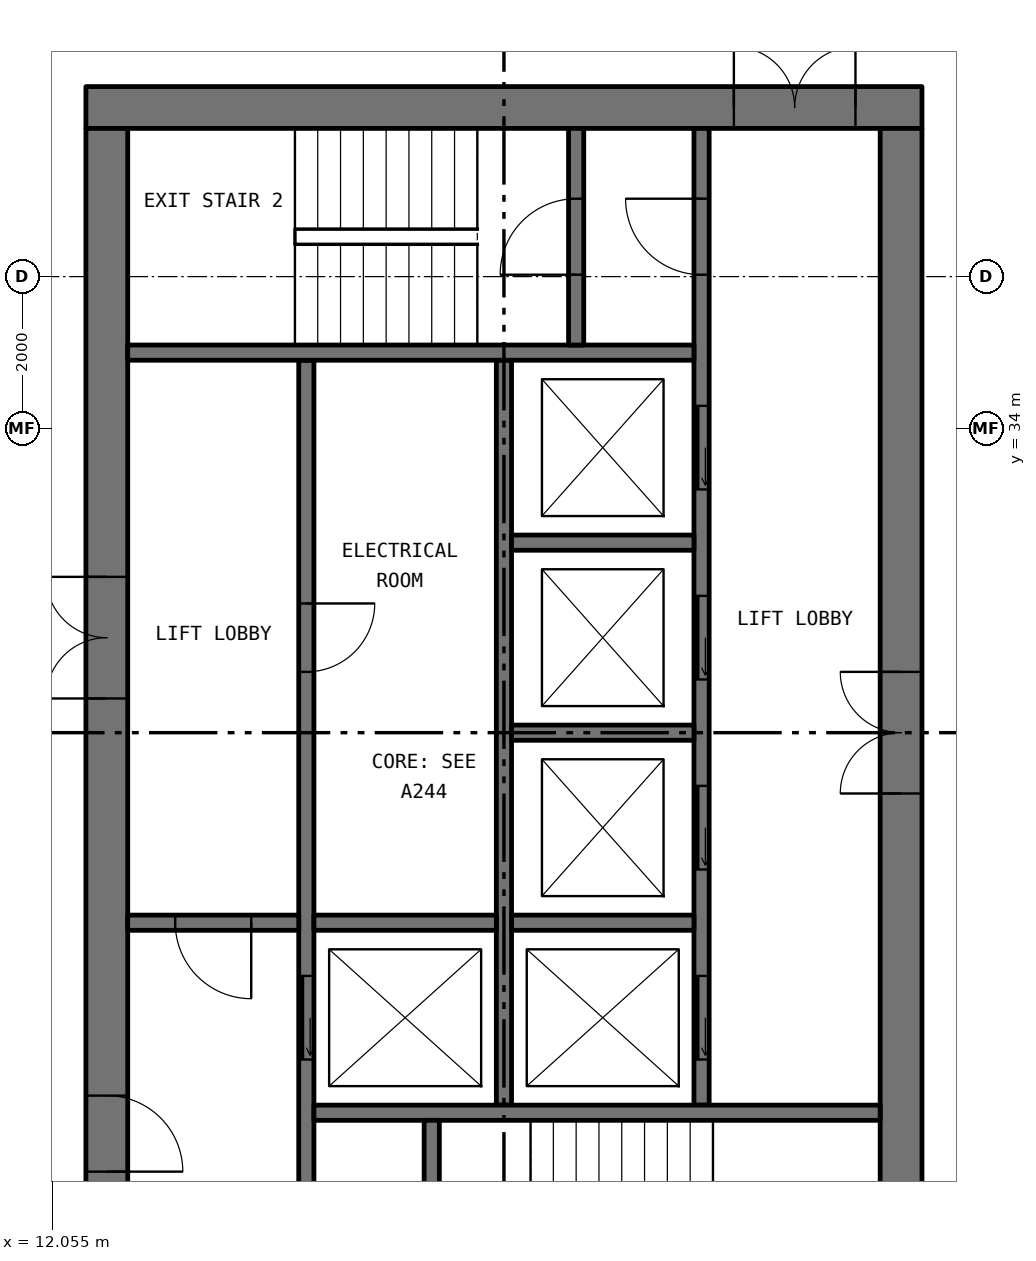
"""IFC4 building model, lengths in metres.
Left out: names, types, materials, properties, quantities, classifications, styles, units other than length and angle.
Written with IfcOpenShell. Run it as: python <this file> out.ifc"""

import sys

from ifc_helpers import new_model, si_unit, direction, frame, frame_2d, origin, place, context, subcontext, project, spatial, rectangle, extrude, element, fill, save


model = new_model("IFC4")
c1 = context("Model", 3, precision=1e-05, world=origin(), true_north=direction((0.0, 1.0)))
c2 = subcontext(c1, "Body", "Model", "MODEL_VIEW")
j1 = project(units=[si_unit("LENGTHUNIT", "METRE"), si_unit("PLANEANGLEUNIT", "RADIAN")], contexts=[c1])
p1 = place(None, origin())
s1 = spatial("IfcSite", under=j1, at=p1, CompositionType="ELEMENT")
p2 = place(p1, origin())
s2 = spatial("IfcBuilding", under=s1, at=p2, CompositionType="ELEMENT")
p3 = place(p2, frame((0.0, 0.0, 165.15)))
s3 = spatial("IfcBuildingStorey", under=s2, at=p3, CompositionType="ELEMENT", Elevation=165.15)
p4 = place(p3, frame((12.5, 38.225, 0.0), z_axis=(0.0, 0.0, 1.0), x_axis=(1.0, 0.0, 0.0)))
e1 = element("IfcWall", 1, at=p4, inside=s3, PredefinedType="SHEAR", context=c2, shape_type="SweptSolid", body=[
    extrude(rectangle(XDim=11.0, YDim=0.55, at=frame_2d((5.5, 0.0))), origin(), (0.0, 0.0, 1.0), 3.05),
])
p5 = place(p4, frame((8.525, 0.0, 0.0)))
e2 = element("IfcOpeningElement", 2, at=p5, cuts=e1, PredefinedType="OPENING", context=c2, shape_type="SweptSolid", body=[
    extrude(rectangle(XDim=1.6, YDim=2.1, at=frame_2d((0.8, 1.05))), frame((0.0, 0.285, 0.0), z_axis=(0.0, -1.0, 0.0), x_axis=(1.0, 0.0, 0.0)), (0.0, 0.0, 1.0), 0.57),
])
p6 = place(p3, frame((12.775, 22.05, 0.0), z_axis=(0.0, 0.0, 1.0), x_axis=(0.0, 1.0, 0.0)))
e3 = element("IfcWall", 3, at=p6, inside=s3, PredefinedType="SHEAR", context=c2, shape_type="SweptSolid", body=[
    extrude(rectangle(XDim=15.9, YDim=0.55, at=frame_2d((7.95, 0.0))), origin(), (0.0, 0.0, 1.0), 3.05),
])
p7 = place(p6, frame((8.4, 0.0, 0.0)))
e4 = element("IfcOpeningElement", 4, at=p7, cuts=e3, PredefinedType="OPENING", context=c2, shape_type="SweptSolid", body=[
    extrude(rectangle(XDim=1.6, YDim=2.1, at=frame_2d((0.8, 1.05))), frame((0.0, 0.285, 0.0), z_axis=(0.0, -1.0, 0.0), x_axis=(1.0, 0.0, 0.0)), (0.0, 0.0, 1.0), 0.57),
])
p8 = place(p6, frame((2.175, 0.0, 0.0)))
e5 = element("IfcOpeningElement", 5, at=p8, cuts=e3, PredefinedType="OPENING", context=c2, shape_type="SweptSolid", body=[
    extrude(rectangle(XDim=1.0, YDim=2.1, at=frame_2d((0.5, 1.05))), frame((0.0, 0.285, 0.0), z_axis=(0.0, -1.0, 0.0), x_axis=(1.0, 0.0, 0.0)), (0.0, 0.0, 1.0), 0.57),
])
p9 = place(p3, frame((23.225, 22.05, 0.0), z_axis=(0.0, 0.0, 1.0), x_axis=(0.0, 1.0, 0.0)))
e6 = element("IfcWall", 6, at=p9, inside=s3, PredefinedType="SHEAR", context=c2, shape_type="SweptSolid", body=[
    extrude(rectangle(XDim=15.9, YDim=0.55, at=frame_2d((7.95, 0.0))), origin(), (0.0, 0.0, 1.0), 3.05),
])
p10 = place(p9, frame((7.15, 0.0, 0.0)))
e7 = element("IfcOpeningElement", 7, at=p10, cuts=e6, PredefinedType="OPENING", context=c2, shape_type="SweptSolid", body=[
    extrude(rectangle(XDim=1.6, YDim=2.1, at=frame_2d((0.8, 1.05))), frame((0.0, 0.285, 0.0), z_axis=(0.0, -1.0, 0.0), x_axis=(1.0, 0.0, 0.0)), (0.0, 0.0, 1.0), 0.57),
])
p11 = place(p3, frame((15.4, 22.05, 0.0), z_axis=(0.0, 0.0, 1.0), x_axis=(0.0, 1.0, 0.0)))
e8 = element("IfcWall", 8, at=p11, inside=s3, PredefinedType="SOLIDWALL", context=c2, shape_type="SweptSolid", body=[
    extrude(rectangle(XDim=12.85, YDim=0.2, at=frame_2d((6.425, 0.0))), origin(), (0.0, 0.0, 1.0), 3.05),
])
p12 = place(p11, frame((3.65, 0.0, 0.0)))
e9 = element("IfcOpeningElement", 9, at=p12, cuts=e8, PredefinedType="OPENING", context=c2, shape_type="SweptSolid", body=[
    extrude(rectangle(XDim=1.1, YDim=2.1, at=frame_2d((0.55, 1.05))), frame((0.0, 0.11, 0.0), z_axis=(0.0, -1.0, 0.0), x_axis=(1.0, 0.0, 0.0)), (0.0, 0.0, 1.0), 0.22),
])
p13 = place(p11, frame((0.15, 0.0, 0.0)))
e10 = element("IfcOpeningElement", 10, at=p13, cuts=e8, PredefinedType="OPENING", context=c2, shape_type="SweptSolid", body=[
    extrude(rectangle(XDim=1.0, YDim=2.1, at=frame_2d((0.5, 1.05))), frame((0.0, 0.11, 0.0), z_axis=(0.0, -1.0, 0.0), x_axis=(1.0, 0.0, 0.0)), (0.0, 0.0, 1.0), 0.22),
])
p14 = place(p11, frame((8.75, 0.0, 0.0)))
e11 = element("IfcOpeningElement", 11, at=p14, cuts=e8, PredefinedType="OPENING", context=c2, shape_type="SweptSolid", body=[
    extrude(rectangle(XDim=0.9, YDim=2.1, at=frame_2d((0.45, 1.05))), frame((0.0, 0.11, 0.0), z_axis=(0.0, -1.0, 0.0), x_axis=(1.0, 0.0, 0.0)), (0.0, 0.0, 1.0), 0.22),
])
p15 = place(p3, frame((20.6, 25.1, 0.0), z_axis=(0.0, 0.0, 1.0), x_axis=(0.0, 1.0, 0.0)))
e12 = element("IfcWall", 12, at=p15, inside=s3, PredefinedType="SOLIDWALL", context=c2, shape_type="SweptSolid", body=[
    extrude(rectangle(XDim=12.85, YDim=0.2, at=frame_2d((6.425, 0.0))), origin(), (0.0, 0.0, 1.0), 3.05),
])
p16 = place(p15, frame((0.6, 0.0, 0.0)))
e13 = element("IfcOpeningElement", 13, at=p16, cuts=e12, PredefinedType="OPENING", context=c2, shape_type="SweptSolid", body=[
    extrude(rectangle(XDim=1.1, YDim=2.1, at=frame_2d((0.55, 1.05))), frame((0.0, 0.11, 0.0), z_axis=(0.0, -1.0, 0.0), x_axis=(1.0, 0.0, 0.0)), (0.0, 0.0, 1.0), 0.22),
])
p17 = place(p15, frame((3.1, 0.0, 0.0)))
e14 = element("IfcOpeningElement", 14, at=p17, cuts=e12, PredefinedType="OPENING", context=c2, shape_type="SweptSolid", body=[
    extrude(rectangle(XDim=1.1, YDim=2.1, at=frame_2d((0.55, 1.05))), frame((0.0, 0.11, 0.0), z_axis=(0.0, -1.0, 0.0), x_axis=(1.0, 0.0, 0.0)), (0.0, 0.0, 1.0), 0.22),
])
p18 = place(p15, frame((5.6, 0.0, 0.0)))
e15 = element("IfcOpeningElement", 15, at=p18, cuts=e12, PredefinedType="OPENING", context=c2, shape_type="SweptSolid", body=[
    extrude(rectangle(XDim=1.1, YDim=2.1, at=frame_2d((0.55, 1.05))), frame((0.0, 0.11, 0.0), z_axis=(0.0, -1.0, 0.0), x_axis=(1.0, 0.0, 0.0)), (0.0, 0.0, 1.0), 0.22),
])
p19 = place(p15, frame((8.1, 0.0, 0.0)))
e16 = element("IfcOpeningElement", 16, at=p19, cuts=e12, PredefinedType="OPENING", context=c2, shape_type="SweptSolid", body=[
    extrude(rectangle(XDim=1.1, YDim=2.1, at=frame_2d((0.55, 1.05))), frame((0.0, 0.11, 0.0), z_axis=(0.0, -1.0, 0.0), x_axis=(1.0, 0.0, 0.0)), (0.0, 0.0, 1.0), 0.22),
])
p20 = place(p15, frame((10.925, 0.0, 0.0)))
e17 = element("IfcOpeningElement", 17, at=p20, cuts=e12, PredefinedType="OPENING", context=c2, shape_type="SweptSolid", body=[
    extrude(rectangle(XDim=1.0, YDim=2.1, at=frame_2d((0.5, 1.05))), frame((0.0, 0.11, 0.0), z_axis=(0.0, -1.0, 0.0), x_axis=(1.0, 0.0, 0.0)), (0.0, 0.0, 1.0), 0.22),
])
p21 = place(p3, frame((18.0, 25.1, 0.0), z_axis=(0.0, 0.0, 1.0), x_axis=(0.0, 1.0, 0.0)))
e18 = element("IfcWall", 18, at=p21, inside=s3, PredefinedType="SOLIDWALL", context=c2, shape_type="SweptSolid", body=[
    extrude(rectangle(XDim=9.8, YDim=0.2, at=frame_2d((4.9, 0.0))), origin(), (0.0, 0.0, 1.0), 3.05),
])
for number, where, z_axis, x_axis in (
    (19, (15.5, 25.0, 0.0), (0.0, 0.0, 1.0), (1.0, 0.0, 0.0)),
    (20, (13.05, 35.0, 0.0), (0.0, 0.0, 1.0), (1.0, 0.0, 0.0)),
):
    element("IfcWall", number, at=place(p3, frame(where, z_axis=z_axis, x_axis=x_axis)), inside=s3, PredefinedType="SOLIDWALL", context=c2, shape_type="SweptSolid", body=[
        extrude(rectangle(XDim=7.45, YDim=0.2, at=frame_2d((3.725, 0.0))), origin(), (0.0, 0.0, 1.0), 3.05),
    ])
p22 = place(p3, frame((13.05, 27.5, 0.0), z_axis=(0.0, 0.0, 1.0), x_axis=(1.0, 0.0, 0.0)))
e21 = element("IfcWall", 21, at=p22, inside=s3, PredefinedType="SOLIDWALL", context=c2, shape_type="SweptSolid", body=[
    extrude(rectangle(XDim=2.25, YDim=0.2, at=frame_2d((1.125, 0.0))), origin(), (0.0, 0.0, 1.0), 3.05),
])
p23 = place(p22, frame((0.625, 0.0, 0.0)))
e22 = element("IfcOpeningElement", 22, at=p23, cuts=e21, PredefinedType="OPENING", context=c2, shape_type="SweptSolid", body=[
    extrude(rectangle(XDim=1.0, YDim=2.1, at=frame_2d((0.5, 1.05))), frame((0.0, 0.11, 0.0), z_axis=(0.0, -1.0, 0.0), x_axis=(1.0, 0.0, 0.0)), (0.0, 0.0, 1.0), 0.22),
])
p24 = place(p3, frame((17.05, 22.05, 0.0), z_axis=(0.0, 0.0, 1.0), x_axis=(0.0, 1.0, 0.0)))
e23 = element("IfcWall", 23, at=p24, inside=s3, PredefinedType="SOLIDWALL", context=c2, shape_type="SweptSolid", body=[
    extrude(rectangle(XDim=2.85, YDim=0.2, at=frame_2d((1.425, 0.0))), origin(), (0.0, 0.0, 1.0), 3.05),
])
p25 = place(p24, frame((0.15, 0.0, 0.0)))
e24 = element("IfcOpeningElement", 24, at=p25, cuts=e23, PredefinedType="OPENING", context=c2, shape_type="SweptSolid", body=[
    extrude(rectangle(XDim=1.0, YDim=2.1, at=frame_2d((0.5, 1.05))), frame((0.0, 0.11, 0.0), z_axis=(0.0, -1.0, 0.0), x_axis=(1.0, 0.0, 0.0)), (0.0, 0.0, 1.0), 0.22),
])
p26 = place(p3, frame((18.95, 35.1, 0.0), z_axis=(0.0, 0.0, 1.0), x_axis=(0.0, 1.0, 0.0)))
e25 = element("IfcWall", 25, at=p26, inside=s3, PredefinedType="SOLIDWALL", context=c2, shape_type="SweptSolid", body=[
    extrude(rectangle(XDim=2.85, YDim=0.2, at=frame_2d((1.425, 0.0))), origin(), (0.0, 0.0, 1.0), 3.05),
])
p27 = place(p26, frame((0.925, 0.0, 0.0)))
e26 = element("IfcOpeningElement", 26, at=p27, cuts=e25, PredefinedType="OPENING", context=c2, shape_type="SweptSolid", body=[
    extrude(rectangle(XDim=1.0, YDim=2.1, at=frame_2d((0.5, 1.05))), frame((0.0, 0.11, 0.0), z_axis=(0.0, -1.0, 0.0), x_axis=(1.0, 0.0, 0.0)), (0.0, 0.0, 1.0), 0.22),
])
for number, where, z_axis, x_axis in (
    (27, (15.5, 27.5, 0.0), (0.0, 0.0, 1.0), (1.0, 0.0, 0.0)),
    (28, (18.1, 27.5, 0.0), (0.0, 0.0, 1.0), (1.0, 0.0, 0.0)),
    (29, (18.1, 30.0, 0.0), (0.0, 0.0, 1.0), (1.0, 0.0, 0.0)),
    (30, (18.1, 32.5, 0.0), (0.0, 0.0, 1.0), (1.0, 0.0, 0.0)),
):
    element("IfcWall", number, at=place(p3, frame(where, z_axis=z_axis, x_axis=x_axis)), inside=s3, PredefinedType="SOLIDWALL", context=c2, shape_type="SweptSolid", body=[
        extrude(rectangle(XDim=2.4, YDim=0.2, at=frame_2d((1.2, 0.0))), origin(), (0.0, 0.0, 1.0), 3.05),
    ])
p28 = place(p16, origin())
e31 = element("IfcDoor", 31, at=p28, inside=s3, OperationType="SLIDING_TO_LEFT", PredefinedType="DOOR", context=c2, shape_type="SweptSolid", body=[
    extrude(rectangle(XDim=1.1, YDim=2.1, at=frame_2d((0.55, 1.05))), frame((0.0, 0.025, 0.0), z_axis=(0.0, -1.0, 0.0), x_axis=(1.0, 0.0, 0.0)), (0.0, 0.0, 1.0), 0.05),
])
fill(e13, e31)
p29 = place(p17, origin())
e32 = element("IfcDoor", 32, at=p29, inside=s3, OperationType="SLIDING_TO_LEFT", PredefinedType="DOOR", context=c2, shape_type="SweptSolid", body=[
    extrude(rectangle(XDim=1.1, YDim=2.1, at=frame_2d((0.55, 1.05))), frame((0.0, 0.025, 0.0), z_axis=(0.0, -1.0, 0.0), x_axis=(1.0, 0.0, 0.0)), (0.0, 0.0, 1.0), 0.05),
])
fill(e14, e32)
p30 = place(p18, origin())
e33 = element("IfcDoor", 33, at=p30, inside=s3, OperationType="SLIDING_TO_LEFT", PredefinedType="DOOR", context=c2, shape_type="SweptSolid", body=[
    extrude(rectangle(XDim=1.1, YDim=2.1, at=frame_2d((0.55, 1.05))), frame((0.0, 0.025, 0.0), z_axis=(0.0, -1.0, 0.0), x_axis=(1.0, 0.0, 0.0)), (0.0, 0.0, 1.0), 0.05),
])
fill(e15, e33)
p31 = place(p19, origin())
e34 = element("IfcDoor", 34, at=p31, inside=s3, OperationType="SLIDING_TO_LEFT", PredefinedType="DOOR", context=c2, shape_type="SweptSolid", body=[
    extrude(rectangle(XDim=1.1, YDim=2.1, at=frame_2d((0.55, 1.05))), frame((0.0, 0.025, 0.0), z_axis=(0.0, -1.0, 0.0), x_axis=(1.0, 0.0, 0.0)), (0.0, 0.0, 1.0), 0.05),
])
fill(e16, e34)
p32 = place(p12, origin())
e35 = element("IfcDoor", 35, at=p32, inside=s3, OperationType="SLIDING_TO_LEFT", PredefinedType="DOOR", context=c2, shape_type="SweptSolid", body=[
    extrude(rectangle(XDim=1.1, YDim=2.1, at=frame_2d((0.55, 1.05))), frame((0.0, 0.025, 0.0), z_axis=(0.0, -1.0, 0.0), x_axis=(1.0, 0.0, 0.0)), (0.0, 0.0, 1.0), 0.05),
])
fill(e9, e35)
p33 = place(p20, origin())
e36 = element("IfcDoor", 36, at=p33, inside=s3, OperationType="SINGLE_SWING_LEFT", PredefinedType="DOOR", context=c2, shape_type="SweptSolid", body=[
    extrude(rectangle(XDim=1.0, YDim=2.1, at=frame_2d((0.5, 1.05))), frame((0.0, 0.025, 0.0), z_axis=(0.0, -1.0, 0.0), x_axis=(1.0, 0.0, 0.0)), (0.0, 0.0, 1.0), 0.05),
])
fill(e17, e36)
p34 = place(p27, origin())
e37 = element("IfcDoor", 37, at=p34, inside=s3, OperationType="SINGLE_SWING_RIGHT", PredefinedType="DOOR", context=c2, shape_type="SweptSolid", body=[
    extrude(rectangle(XDim=1.0, YDim=2.1, at=frame_2d((0.5, 1.05))), frame((0.0, 0.025, 0.0), z_axis=(0.0, -1.0, 0.0), x_axis=(1.0, 0.0, 0.0)), (0.0, 0.0, 1.0), 0.05),
])
fill(e26, e37)
p35 = place(p23, frame((1.0, 0.0, 0.0), x_axis=(-1.0, 0.0, 0.0)))
e38 = element("IfcDoor", 38, at=p35, inside=s3, OperationType="SINGLE_SWING_RIGHT", PredefinedType="DOOR", context=c2, shape_type="SweptSolid", body=[
    extrude(rectangle(XDim=1.0, YDim=2.1, at=frame_2d((0.5, 1.05))), frame((0.0, 0.025, 0.0), z_axis=(0.0, -1.0, 0.0), x_axis=(1.0, 0.0, 0.0)), (0.0, 0.0, 1.0), 0.05),
])
fill(e22, e38)
p36 = place(p7, origin())
e39 = element("IfcDoor", 39, at=p36, inside=s3, OperationType="DOUBLE_DOOR_SINGLE_SWING", PredefinedType="DOOR", context=c2, shape_type="SweptSolid", body=[
    extrude(rectangle(XDim=1.6, YDim=2.1, at=frame_2d((0.8, 1.05))), frame((0.0, 0.025, 0.0), z_axis=(0.0, -1.0, 0.0), x_axis=(1.0, 0.0, 0.0)), (0.0, 0.0, 1.0), 0.05),
])
fill(e4, e39)
p37 = place(p8, frame((1.0, 0.0, 0.0), x_axis=(-1.0, 0.0, 0.0)))
e40 = element("IfcDoor", 40, at=p37, inside=s3, OperationType="SINGLE_SWING_LEFT", PredefinedType="DOOR", context=c2, shape_type="SweptSolid", body=[
    extrude(rectangle(XDim=1.0, YDim=2.1, at=frame_2d((0.5, 1.05))), frame((0.0, 0.025, 0.0), z_axis=(0.0, -1.0, 0.0), x_axis=(1.0, 0.0, 0.0)), (0.0, 0.0, 1.0), 0.05),
])
fill(e5, e40)
p38 = place(p5, origin())
e41 = element("IfcDoor", 41, at=p38, inside=s3, OperationType="DOUBLE_DOOR_SINGLE_SWING", PredefinedType="DOOR", context=c2, shape_type="SweptSolid", body=[
    extrude(rectangle(XDim=1.6, YDim=2.1, at=frame_2d((0.8, 1.05))), frame((0.0, 0.025, 0.0), z_axis=(0.0, -1.0, 0.0), x_axis=(1.0, 0.0, 0.0)), (0.0, 0.0, 1.0), 0.05),
])
fill(e2, e41)
p39 = place(p10, origin())
e42 = element("IfcDoor", 42, at=p39, inside=s3, OperationType="DOUBLE_DOOR_SINGLE_SWING", PredefinedType="DOOR", context=c2, shape_type="SweptSolid", body=[
    extrude(rectangle(XDim=1.6, YDim=2.1, at=frame_2d((0.8, 1.05))), frame((0.0, 0.025, 0.0), z_axis=(0.0, -1.0, 0.0), x_axis=(1.0, 0.0, 0.0)), (0.0, 0.0, 1.0), 0.05),
])
fill(e7, e42)
p40 = place(p14, frame((0.9, 0.0, 0.0), x_axis=(-1.0, 0.0, 0.0)))
e43 = element("IfcDoor", 43, at=p40, inside=s3, OperationType="SINGLE_SWING_RIGHT", PredefinedType="DOOR", context=c2, shape_type="SweptSolid", body=[
    extrude(rectangle(XDim=0.9, YDim=2.1, at=frame_2d((0.45, 1.05))), frame((0.0, 0.025, 0.0), z_axis=(0.0, -1.0, 0.0), x_axis=(1.0, 0.0, 0.0)), (0.0, 0.0, 1.0), 0.05),
])
fill(e11, e43)
save(model, sys.argv[1])
